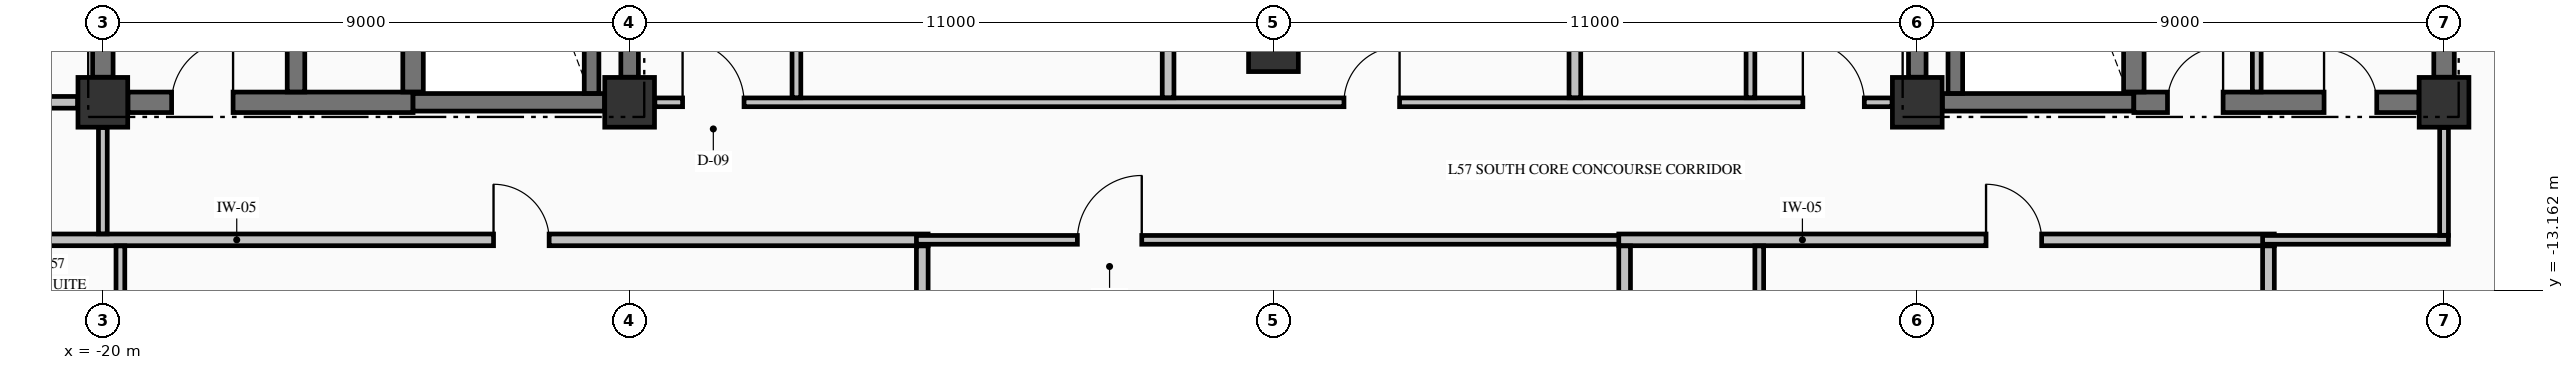
"""IFC4 building model, lengths in metres.
Left out: names, types, materials, properties, quantities, classifications, styles, units other than length and angle.
Written with IfcOpenShell. Run it as: python <this file> out.ifc"""

import sys

from ifc_helpers import new_model, si_unit, direction, frame, frame_2d, origin, origin_2d, place, context, subcontext, project, spatial, rectangle, extrude, element, fill, save


model = new_model("IFC4")
c1 = context("Model", 3, precision=1e-05, world=origin(), true_north=direction((0.0, 1.0)))
c2 = subcontext(c1, "Body", "Model", "MODEL_VIEW")
j1 = project(units=[si_unit("LENGTHUNIT", "METRE"), si_unit("PLANEANGLEUNIT", "RADIAN")], contexts=[c1])
p1 = place(None, origin())
s1 = spatial("IfcSite", under=j1, at=p1, CompositionType="ELEMENT")
p2 = place(p1, origin())
s2 = spatial("IfcBuilding", under=s1, at=p2, CompositionType="ELEMENT")
p3 = place(p2, frame((0.0, 0.0, 218.66)))
s3 = spatial("IfcBuildingStorey", under=s2, at=p3, CompositionType="ELEMENT", Elevation=218.66)
for number, where, z_axis, x_axis in (
    (1, (-20.0, -9.95, -0.25), (0.0, 0.0, 1.0), (1.0, 0.0, 0.0)),
    (2, (-11.0, -9.95, -0.25), (0.0, 0.0, 1.0), (1.0, 0.0, 0.0)),
    (3, (11.0, -9.95, -0.25), (0.0, 0.0, 1.0), (1.0, 0.0, 0.0)),
    (4, (20.0, -9.95, -0.25), (0.0, 0.0, 1.0), (1.0, 0.0, 0.0)),
    (5, (0.0, -9.0, -0.25), (0.0, 0.0, 1.0), (1.0, 0.0, 0.0)),
):
    element("IfcColumn", number, at=place(p3, frame(where, z_axis=z_axis, x_axis=x_axis)), inside=s3, PredefinedType="COLUMN", context=c2, shape_type="SweptSolid", body=[
        extrude(rectangle(XDim=0.85, YDim=0.85, at=origin_2d()), origin(), (0.0, 0.0, 1.0), 3.225),
    ])
p4 = place(p3, frame((-19.571, -9.95, 0.0), z_axis=(0.0, 0.0, 1.0), x_axis=(1.0, 0.0, 0.0)))
e6 = element("IfcWall", 6, at=p4, inside=s3, PredefinedType="SHEAR", context=c2, shape_type="SweptSolid", body=[
    extrude(rectangle(XDim=4.871, YDim=0.35, at=frame_2d((2.436, 0.0))), origin(), (0.0, 0.0, 1.0), 2.975),
])
p5 = place(p4, frame((0.746, 0.0, 0.0)))
e7 = element("IfcOpeningElement", 7, at=p5, cuts=e6, PredefinedType="OPENING", context=c2, shape_type="SweptSolid", body=[
    extrude(rectangle(XDim=1.05, YDim=2.15, at=frame_2d((0.525, 1.075))), frame((0.0, 0.185, 0.0), z_axis=(0.0, -1.0, 0.0), x_axis=(1.0, 0.0, 0.0)), (0.0, 0.0, 1.0), 0.37),
])
for number, where, z_axis, x_axis in (
    (8, (-14.7, -9.95, 0.0), (0.0, 0.0, 1.0), (1.0, 0.0, 0.0)),
    (9, (11.429, -9.95, 0.0), (0.0, 0.0, 1.0), (1.0, 0.0, 0.0)),
):
    element("IfcWall", number, at=place(p3, frame(where, z_axis=z_axis, x_axis=x_axis)), inside=s3, PredefinedType="SHEAR", context=c2, shape_type="SweptSolid", body=[
        extrude(rectangle(XDim=3.271, YDim=0.3, at=frame_2d((1.635, 0.0))), origin(), (0.0, 0.0, 1.0), 2.975),
    ])
p6 = place(p3, frame((14.7, -9.95, 0.0), z_axis=(0.0, 0.0, 1.0), x_axis=(1.0, 0.0, 0.0)))
e10 = element("IfcWall", 10, at=p6, inside=s3, PredefinedType="SHEAR", context=c2, shape_type="SweptSolid", body=[
    extrude(rectangle(XDim=4.871, YDim=0.35, at=frame_2d((2.436, 0.0))), origin(), (0.0, 0.0, 1.0), 2.975),
])
p7 = place(p6, frame((3.25, 0.0, 0.0)))
e11 = element("IfcOpeningElement", 11, at=p7, cuts=e10, PredefinedType="OPENING", context=c2, shape_type="SweptSolid", body=[
    extrude(rectangle(XDim=0.9, YDim=2.15, at=frame_2d((0.45, 1.075))), frame((0.0, 0.185, 0.0), z_axis=(0.0, -1.0, 0.0), x_axis=(1.0, 0.0, 0.0)), (0.0, 0.0, 1.0), 0.37),
])
p8 = place(p6, frame((0.575, 0.0, 0.0)))
e12 = element("IfcOpeningElement", 12, at=p8, cuts=e10, PredefinedType="OPENING", context=c2, shape_type="SweptSolid", body=[
    extrude(rectangle(XDim=0.95, YDim=2.15, at=frame_2d((0.475, 1.075))), frame((0.0, 0.185, 0.0), z_axis=(0.0, -1.0, 0.0), x_axis=(1.0, 0.0, 0.0)), (0.0, 0.0, 1.0), 0.37),
])
p9 = place(p3, frame((-22.1, -12.3, 0.0), z_axis=(0.0, 0.0, 1.0), x_axis=(1.0, 0.0, 0.0)))
e13 = element("IfcWall", 13, at=p9, inside=s3, PredefinedType="PARTITIONING", context=c2, shape_type="SweptSolid", body=[
    extrude(rectangle(XDim=16.2, YDim=0.2, at=frame_2d((8.1, 0.0))), origin(), (0.0, 0.0, 1.0), 2.975),
])
p10 = place(p9, frame((8.775, 0.0, 0.0)))
e14 = element("IfcOpeningElement", 14, at=p10, cuts=e13, PredefinedType="OPENING", context=c2, shape_type="SweptSolid", body=[
    extrude(rectangle(XDim=0.95, YDim=2.15, at=frame_2d((0.475, 1.075))), frame((0.0, 0.11, 0.0), z_axis=(0.0, -1.0, 0.0), x_axis=(1.0, 0.0, 0.0)), (0.0, 0.0, 1.0), 0.22),
])
p11 = place(p3, frame((-6.1, -12.3, 0.0), z_axis=(0.0, 0.0, 1.0), x_axis=(1.0, 0.0, 0.0)))
e15 = element("IfcWall", 15, at=p11, inside=s3, PredefinedType="PARTITIONING", context=c2, shape_type="SweptSolid", body=[
    extrude(rectangle(XDim=12.2, YDim=0.15, at=frame_2d((6.1, 0.0))), origin(), (0.0, 0.0, 1.0), 2.975),
])
p12 = place(p11, frame((2.75, 0.0, 0.0)))
e16 = element("IfcOpeningElement", 16, at=p12, cuts=e15, PredefinedType="OPENING", context=c2, shape_type="SweptSolid", body=[
    extrude(rectangle(XDim=1.1, YDim=2.15, at=frame_2d((0.55, 1.075))), frame((0.0, 0.085, 0.0), z_axis=(0.0, -1.0, 0.0), x_axis=(1.0, 0.0, 0.0)), (0.0, 0.0, 1.0), 0.17),
])
p13 = place(p3, frame((5.9, -12.3, 0.0), z_axis=(0.0, 0.0, 1.0), x_axis=(1.0, 0.0, 0.0)))
e17 = element("IfcWall", 17, at=p13, inside=s3, PredefinedType="PARTITIONING", context=c2, shape_type="SweptSolid", body=[
    extrude(rectangle(XDim=11.2, YDim=0.2, at=frame_2d((5.6, 0.0))), origin(), (0.0, 0.0, 1.0), 2.975),
])
p14 = place(p13, frame((6.275, 0.0, 0.0)))
e18 = element("IfcOpeningElement", 18, at=p14, cuts=e17, PredefinedType="OPENING", context=c2, shape_type="SweptSolid", body=[
    extrude(rectangle(XDim=0.95, YDim=2.15, at=frame_2d((0.475, 1.075))), frame((0.0, 0.11, 0.0), z_axis=(0.0, -1.0, 0.0), x_axis=(1.0, 0.0, 0.0)), (0.0, 0.0, 1.0), 0.22),
])
p15 = place(p3, frame((16.9, -12.3, 0.0), z_axis=(0.0, 0.0, 1.0), x_axis=(1.0, 0.0, 0.0)))
e19 = element("IfcWall", 19, at=p15, inside=s3, PredefinedType="PARTITIONING", context=c2, shape_type="SweptSolid", body=[
    extrude(rectangle(XDim=3.175, YDim=0.15, at=frame_2d((1.587, 0.0))), origin(), (0.0, 0.0, 1.0), 2.975),
])
p16 = place(p3, frame((-26.835, -9.95, 0.0), z_axis=(0.0, 0.0, 1.0), x_axis=(1.0, 0.0, 0.0)))
e20 = element("IfcWall", 20, at=p16, inside=s3, PredefinedType="PARTITIONING", context=c2, shape_type="SweptSolid", body=[
    extrude(rectangle(XDim=6.404, YDim=0.2, at=frame_2d((3.202, 0.0))), origin(), (0.0, 0.0, 1.0), 2.975),
])
p17 = place(p3, frame((-10.569, -9.95, 0.0), z_axis=(0.0, 0.0, 1.0), x_axis=(1.0, 0.0, 0.0)))
e21 = element("IfcWall", 21, at=p17, inside=s3, PredefinedType="PARTITIONING", context=c2, shape_type="SweptSolid", body=[
    extrude(rectangle(XDim=21.138, YDim=0.15, at=frame_2d((10.569, 0.0))), origin(), (0.0, 0.0, 1.0), 2.975),
])
p18 = place(p17, frame((0.474, 0.0, 0.0)))
e22 = element("IfcOpeningElement", 22, at=p18, cuts=e21, PredefinedType="OPENING", context=c2, shape_type="SweptSolid", body=[
    extrude(rectangle(XDim=1.05, YDim=2.15, at=frame_2d((0.525, 1.075))), frame((0.0, 0.085, 0.0), z_axis=(0.0, -1.0, 0.0), x_axis=(1.0, 0.0, 0.0)), (0.0, 0.0, 1.0), 0.17),
])
p19 = place(p17, frame((19.614, 0.0, 0.0)))
e23 = element("IfcOpeningElement", 23, at=p19, cuts=e21, PredefinedType="OPENING", context=c2, shape_type="SweptSolid", body=[
    extrude(rectangle(XDim=1.05, YDim=2.15, at=frame_2d((0.525, 1.075))), frame((0.0, 0.085, 0.0), z_axis=(0.0, -1.0, 0.0), x_axis=(1.0, 0.0, 0.0)), (0.0, 0.0, 1.0), 0.17),
])
p20 = place(p17, frame((11.774, 0.0, 0.0)))
e24 = element("IfcOpeningElement", 24, at=p20, cuts=e21, PredefinedType="OPENING", context=c2, shape_type="SweptSolid", body=[
    extrude(rectangle(XDim=0.95, YDim=2.15, at=frame_2d((0.475, 1.075))), frame((0.0, 0.085, 0.0), z_axis=(0.0, -1.0, 0.0), x_axis=(1.0, 0.0, 0.0)), (0.0, 0.0, 1.0), 0.17),
])
p21 = place(p3, frame((-20.0, -9.521, 0.0), z_axis=(0.0, 0.0, 1.0), x_axis=(0.0, 1.0, 0.0)))
e25 = element("IfcWall", 25, at=p21, inside=s3, PredefinedType="SHEAR", context=c2, shape_type="SweptSolid", body=[
    extrude(rectangle(XDim=9.092, YDim=0.35, at=frame_2d((4.546, 0.0))), origin(), (0.0, 0.0, 1.0), 2.975),
])
p22 = place(p3, frame((-16.7, -9.773, 0.0), z_axis=(0.0, 0.0, 1.0), x_axis=(0.0, 1.0, 0.0)))
e26 = element("IfcWall", 26, at=p22, inside=s3, PredefinedType="SHEAR", context=c2, shape_type="SweptSolid", body=[
    extrude(rectangle(XDim=9.371, YDim=0.3, at=frame_2d((4.686, 0.0))), origin(), (0.0, 0.0, 1.0), 2.975),
])
p23 = place(p3, frame((-14.7, -9.773, 0.0), z_axis=(0.0, 0.0, 1.0), x_axis=(0.0, 1.0, 0.0)))
e27 = element("IfcWall", 27, at=p23, inside=s3, PredefinedType="SHEAR", context=c2, shape_type="SweptSolid", body=[
    extrude(rectangle(XDim=9.371, YDim=0.35, at=frame_2d((4.686, 0.0))), origin(), (0.0, 0.0, 1.0), 2.975),
])
p24 = place(p3, frame((-11.65, -9.798, 0.0), z_axis=(0.0, 0.0, 1.0), x_axis=(0.0, 1.0, 0.0)))
e28 = element("IfcWall", 28, at=p24, inside=s3, PredefinedType="SOLIDWALL", context=c2, shape_type="SweptSolid", body=[
    extrude(rectangle(XDim=9.396, YDim=0.25, at=frame_2d((4.698, 0.0))), origin(), (0.0, 0.0, 1.0), 2.975),
])
for number, where, z_axis, x_axis in (
    (29, (-11.0, -9.521, 0.0), (0.0, 0.0, 1.0), (0.0, 1.0, 0.0)),
    (30, (11.0, -9.521, 0.0), (0.0, 0.0, 1.0), (0.0, 1.0, 0.0)),
):
    element("IfcWall", number, at=place(p3, frame(where, z_axis=z_axis, x_axis=x_axis)), inside=s3, PredefinedType="SHEAR", context=c2, shape_type="SweptSolid", body=[
        extrude(rectangle(XDim=9.092, YDim=0.3, at=frame_2d((4.546, 0.0))), origin(), (0.0, 0.0, 1.0), 2.975),
    ])
p25 = place(p3, frame((11.65, -9.798, 0.0), z_axis=(0.0, 0.0, 1.0), x_axis=(0.0, 1.0, 0.0)))
e31 = element("IfcWall", 31, at=p25, inside=s3, PredefinedType="SOLIDWALL", context=c2, shape_type="SweptSolid", body=[
    extrude(rectangle(XDim=9.396, YDim=0.25, at=frame_2d((4.698, 0.0))), origin(), (0.0, 0.0, 1.0), 2.975),
])
p26 = place(p3, frame((14.7, -9.773, 0.0), z_axis=(0.0, 0.0, 1.0), x_axis=(0.0, 1.0, 0.0)))
e32 = element("IfcWall", 32, at=p26, inside=s3, PredefinedType="SHEAR", context=c2, shape_type="SweptSolid", body=[
    extrude(rectangle(XDim=9.371, YDim=0.35, at=frame_2d((4.686, 0.0))), origin(), (0.0, 0.0, 1.0), 2.975),
])
p27 = place(p3, frame((20.0, -9.521, 0.0), z_axis=(0.0, 0.0, 1.0), x_axis=(0.0, 1.0, 0.0)))
e33 = element("IfcWall", 33, at=p27, inside=s3, PredefinedType="SHEAR", context=c2, shape_type="SweptSolid", body=[
    extrude(rectangle(XDim=9.092, YDim=0.35, at=frame_2d((4.546, 0.0))), origin(), (0.0, 0.0, 1.0), 2.975),
])
p28 = place(p3, frame((-20.0, -12.197, 0.0), z_axis=(0.0, 0.0, 1.0), x_axis=(0.0, 1.0, 0.0)))
e34 = element("IfcWall", 34, at=p28, inside=s3, PredefinedType="PARTITIONING", context=c2, shape_type="SweptSolid", body=[
    extrude(rectangle(XDim=1.816, YDim=0.15, at=frame_2d((0.908, 0.0))), origin(), (0.0, 0.0, 1.0), 2.167),
])
p29 = place(p3, frame((-19.7, -15.172, 0.0), z_axis=(0.0, 0.0, 1.0), x_axis=(0.0, 1.0, 0.0)))
e35 = element("IfcWall", 35, at=p29, inside=s3, PredefinedType="PARTITIONING", context=c2, shape_type="SweptSolid", body=[
    extrude(rectangle(XDim=2.769, YDim=0.15, at=frame_2d((1.385, 0.0))), origin(), (0.0, 0.0, 1.0), 2.167),
])
p30 = place(p3, frame((-8.15, -9.872, 0.0), z_axis=(0.0, 0.0, 1.0), x_axis=(0.0, 1.0, 0.0)))
e36 = element("IfcWall", 36, at=p30, inside=s3, PredefinedType="PARTITIONING", context=c2, shape_type="SweptSolid", body=[
    extrude(rectangle(XDim=7.169, YDim=0.15, at=frame_2d((3.584, 0.0))), origin(), (0.0, 0.0, 1.0), 2.975),
])
p31 = place(p30, frame((3.102, 0.0, 0.0)))
e37 = element("IfcOpeningElement", 37, at=p31, cuts=e36, PredefinedType="OPENING", context=c2, shape_type="SweptSolid", body=[
    extrude(rectangle(XDim=1.0, YDim=2.15, at=frame_2d((0.5, 1.075))), frame((0.0, 0.085, 0.0), z_axis=(0.0, -1.0, 0.0), x_axis=(1.0, 0.0, 0.0)), (0.0, 0.0, 1.0), 0.17),
])
p32 = place(p3, frame((-6.0, -16.472, 0.0), z_axis=(0.0, 0.0, 1.0), x_axis=(0.0, 1.0, 0.0)))
e38 = element("IfcWall", 38, at=p32, inside=s3, PredefinedType="PARTITIONING", context=c2, shape_type="SweptSolid", body=[
    extrude(rectangle(XDim=4.069, YDim=0.2, at=frame_2d((2.034, 0.0))), origin(), (0.0, 0.0, 1.0), 2.975),
])
for number, where, z_axis, x_axis in (
    (39, (-1.8, -9.872, 0.0), (0.0, 0.0, 1.0), (0.0, 1.0, 0.0)),
    (40, (5.15, -9.872, 0.0), (0.0, 0.0, 1.0), (0.0, 1.0, 0.0)),
):
    element("IfcWall", number, at=place(p3, frame(where, z_axis=z_axis, x_axis=x_axis)), inside=s3, PredefinedType="PARTITIONING", context=c2, shape_type="SweptSolid", body=[
        extrude(rectangle(XDim=4.569, YDim=0.2, at=frame_2d((2.285, 0.0))), origin(), (0.0, 0.0, 1.0), 2.975),
    ])
p33 = place(p3, frame((6.0, -14.472, 0.0), z_axis=(0.0, 0.0, 1.0), x_axis=(0.0, 1.0, 0.0)))
e41 = element("IfcWall", 41, at=p33, inside=s3, PredefinedType="PARTITIONING", context=c2, shape_type="SweptSolid", body=[
    extrude(rectangle(XDim=2.069, YDim=0.2, at=frame_2d((1.034, 0.0))), origin(), (0.0, 0.0, 1.0), 2.975),
])
p34 = place(p3, frame((8.15, -9.872, 0.0), z_axis=(0.0, 0.0, 1.0), x_axis=(0.0, 1.0, 0.0)))
e42 = element("IfcWall", 42, at=p34, inside=s3, PredefinedType="PARTITIONING", context=c2, shape_type="SweptSolid", body=[
    extrude(rectangle(XDim=4.569, YDim=0.15, at=frame_2d((2.285, 0.0))), origin(), (0.0, 0.0, 1.0), 2.975),
])
p35 = place(p34, frame((1.847, 0.0, 0.0)))
e43 = element("IfcOpeningElement", 43, at=p35, cuts=e42, PredefinedType="OPENING", context=c2, shape_type="SweptSolid", body=[
    extrude(rectangle(XDim=0.95, YDim=2.15, at=frame_2d((0.475, 1.075))), frame((0.0, 0.085, 0.0), z_axis=(0.0, -1.0, 0.0), x_axis=(1.0, 0.0, 0.0)), (0.0, 0.0, 1.0), 0.17),
])
p36 = place(p3, frame((8.3, -14.472, 0.0), z_axis=(0.0, 0.0, 1.0), x_axis=(0.0, 1.0, 0.0)))
e44 = element("IfcWall", 44, at=p36, inside=s3, PredefinedType="PARTITIONING", context=c2, shape_type="SweptSolid", body=[
    extrude(rectangle(XDim=2.069, YDim=0.15, at=frame_2d((1.034, 0.0))), origin(), (0.0, 0.0, 1.0), 2.975),
])
p37 = place(p3, frame((16.8, -9.772, 0.0), z_axis=(0.0, 0.0, 1.0), x_axis=(0.0, 1.0, 0.0)))
e45 = element("IfcWall", 45, at=p37, inside=s3, PredefinedType="PARTITIONING", context=c2, shape_type="SweptSolid", body=[
    extrude(rectangle(XDim=7.194, YDim=0.15, at=frame_2d((3.597, 0.0))), origin(), (0.0, 0.0, 1.0), 2.975),
])
p38 = place(p3, frame((17.0, -18.994, 0.0), z_axis=(0.0, 0.0, 1.0), x_axis=(0.0, 1.0, 0.0)))
e46 = element("IfcWall", 46, at=p38, inside=s3, PredefinedType="PARTITIONING", context=c2, shape_type="SweptSolid", body=[
    extrude(rectangle(XDim=6.591, YDim=0.2, at=frame_2d((3.295, 0.0))), origin(), (0.0, 0.0, 1.0), 2.975),
])
p39 = place(p3, frame((20.0, -12.222, 0.0), z_axis=(0.0, 0.0, 1.0), x_axis=(0.0, 1.0, 0.0)))
e47 = element("IfcWall", 47, at=p39, inside=s3, PredefinedType="PARTITIONING", context=c2, shape_type="SweptSolid", body=[
    extrude(rectangle(XDim=1.841, YDim=0.15, at=frame_2d((0.92, 0.0))), origin(), (0.0, 0.0, 1.0), 2.167),
])
p40 = place(p5, origin())
e48 = element("IfcDoor", 48, at=p40, inside=s3, OperationType="SINGLE_SWING_RIGHT", PredefinedType="DOOR", context=c2, shape_type="SweptSolid", body=[
    extrude(rectangle(XDim=1.05, YDim=2.15, at=frame_2d((0.525, 1.075))), frame((0.0, 0.025, 0.0), z_axis=(0.0, -1.0, 0.0), x_axis=(1.0, 0.0, 0.0)), (0.0, 0.0, 1.0), 0.05),
])
fill(e7, e48)
p41 = place(p7, origin())
e49 = element("IfcDoor", 49, at=p41, inside=s3, OperationType="SINGLE_SWING_LEFT", PredefinedType="DOOR", context=c2, shape_type="SweptSolid", body=[
    extrude(rectangle(XDim=0.9, YDim=2.15, at=frame_2d((0.45, 1.075))), frame((0.0, 0.025, 0.0), z_axis=(0.0, -1.0, 0.0), x_axis=(1.0, 0.0, 0.0)), (0.0, 0.0, 1.0), 0.05),
])
fill(e11, e49)
p42 = place(p8, origin())
e50 = element("IfcDoor", 50, at=p42, inside=s3, OperationType="SINGLE_SWING_RIGHT", PredefinedType="DOOR", context=c2, shape_type="SweptSolid", body=[
    extrude(rectangle(XDim=0.95, YDim=2.15, at=frame_2d((0.475, 1.075))), frame((0.0, 0.025, 0.0), z_axis=(0.0, -1.0, 0.0), x_axis=(1.0, 0.0, 0.0)), (0.0, 0.0, 1.0), 0.05),
])
fill(e12, e50)
p43 = place(p18, origin())
e51 = element("IfcDoor", 51, at=p43, inside=s3, OperationType="SINGLE_SWING_LEFT", PredefinedType="DOOR", context=c2, shape_type="SweptSolid", body=[
    extrude(rectangle(XDim=1.05, YDim=2.15, at=frame_2d((0.525, 1.075))), frame((0.0, 0.025, 0.0), z_axis=(0.0, -1.0, 0.0), x_axis=(1.0, 0.0, 0.0)), (0.0, 0.0, 1.0), 0.05),
])
fill(e22, e51)
p44 = place(p19, origin())
e52 = element("IfcDoor", 52, at=p44, inside=s3, OperationType="SINGLE_SWING_LEFT", PredefinedType="DOOR", context=c2, shape_type="SweptSolid", body=[
    extrude(rectangle(XDim=1.05, YDim=2.15, at=frame_2d((0.525, 1.075))), frame((0.0, 0.025, 0.0), z_axis=(0.0, -1.0, 0.0), x_axis=(1.0, 0.0, 0.0)), (0.0, 0.0, 1.0), 0.05),
])
fill(e23, e52)
p45 = place(p12, origin())
e53 = element("IfcDoor", 53, at=p45, inside=s3, OperationType="SINGLE_SWING_RIGHT", PredefinedType="DOOR", context=c2, shape_type="SweptSolid", body=[
    extrude(rectangle(XDim=1.1, YDim=2.15, at=frame_2d((0.55, 1.075))), frame((0.0, 0.025, 0.0), z_axis=(0.0, -1.0, 0.0), x_axis=(1.0, 0.0, 0.0)), (0.0, 0.0, 1.0), 0.05),
])
fill(e16, e53)
p46 = place(p10, origin())
e54 = element("IfcDoor", 54, at=p46, inside=s3, OperationType="SINGLE_SWING_LEFT", PredefinedType="DOOR", context=c2, shape_type="SweptSolid", body=[
    extrude(rectangle(XDim=0.95, YDim=2.15, at=frame_2d((0.475, 1.075))), frame((0.0, 0.025, 0.0), z_axis=(0.0, -1.0, 0.0), x_axis=(1.0, 0.0, 0.0)), (0.0, 0.0, 1.0), 0.05),
])
fill(e14, e54)
p47 = place(p14, origin())
e55 = element("IfcDoor", 55, at=p47, inside=s3, OperationType="SINGLE_SWING_LEFT", PredefinedType="DOOR", context=c2, shape_type="SweptSolid", body=[
    extrude(rectangle(XDim=0.95, YDim=2.15, at=frame_2d((0.475, 1.075))), frame((0.0, 0.025, 0.0), z_axis=(0.0, -1.0, 0.0), x_axis=(1.0, 0.0, 0.0)), (0.0, 0.0, 1.0), 0.05),
])
fill(e18, e55)
p48 = place(p20, origin())
e56 = element("IfcDoor", 56, at=p48, inside=s3, OperationType="SINGLE_SWING_RIGHT", PredefinedType="DOOR", context=c2, shape_type="SweptSolid", body=[
    extrude(rectangle(XDim=0.95, YDim=2.15, at=frame_2d((0.475, 1.075))), frame((0.0, 0.025, 0.0), z_axis=(0.0, -1.0, 0.0), x_axis=(1.0, 0.0, 0.0)), (0.0, 0.0, 1.0), 0.05),
])
fill(e24, e56)
save(model, sys.argv[1])
